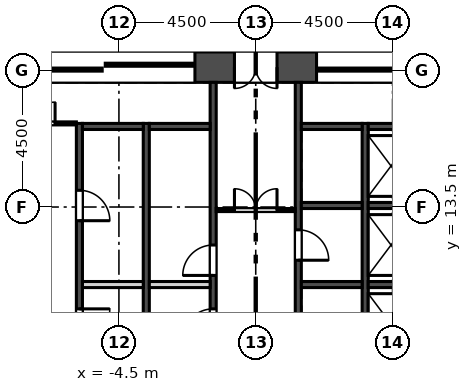
"""IFC4 building model, lengths in metres.
Left out: names, types, materials, properties, quantities, classifications, styles, units other than length and angle.
Written with IfcOpenShell. Run it as: python <this file> out.ifc"""

import sys

from ifc_helpers import new_model, si_unit, direction, frame, frame_2d, origin, place, context, subcontext, project, spatial, rectangle, extrude, element, fill, save


model = new_model("IFC4")
c1 = context("Model", 3, precision=1e-05, world=origin(), true_north=direction((0.0, 1.0)))
c2 = subcontext(c1, "Body", "Model", "MODEL_VIEW")
j1 = project(units=[si_unit("LENGTHUNIT", "METRE"), si_unit("PLANEANGLEUNIT", "RADIAN")], contexts=[c1])
p1 = place(None, origin())
s1 = spatial("IfcSite", under=j1, at=p1, CompositionType="ELEMENT")
p2 = place(p1, origin())
s2 = spatial("IfcBuilding", under=s1, at=p2, CompositionType="ELEMENT")
p3 = place(p2, frame((0.0, 0.0, 218.1)))
s3 = spatial("IfcBuildingStorey", under=s2, at=p3, CompositionType="ELEMENT", Elevation=218.1)
p4 = place(p3, frame((9.181, 18.1, 0.0), z_axis=(0.0, 0.0, 1.0), x_axis=(-1.0, 0.0, 0.0)))
e1 = element("IfcWall", 1, at=p4, inside=s3, PredefinedType="SHEAR", context=c2, shape_type="SweptSolid", body=[
    extrude(rectangle(XDim=18.361, YDim=1.0, at=frame_2d((9.181, 0.0))), origin(), (0.0, 0.0, 1.0), 5.4),
])
p5 = place(p4, frame((8.481, 0.0, 0.0)))
e2 = element("IfcOpeningElement", 2, at=p5, cuts=e1, PredefinedType="OPENING", context=c2, shape_type="SweptSolid", body=[
    extrude(rectangle(XDim=1.4, YDim=2.1, at=frame_2d((0.7, 1.05))), frame((0.0, 0.51, 0.0), z_axis=(0.0, -1.0, 0.0), x_axis=(1.0, 0.0, 0.0)), (0.0, 0.0, 1.0), 1.02),
])
p6 = place(p4, frame((11.181, 0.0, 0.0)))
e3 = element("IfcOpeningElement", 3, at=p6, cuts=e1, PredefinedType="OPENING", context=c2, shape_type="SweptSolid", body=[
    extrude(rectangle(XDim=6.0, YDim=2.4, at=frame_2d((3.0, 1.2))), frame((0.0, 0.51, 0.0), z_axis=(0.0, -1.0, 0.0), x_axis=(1.0, 0.0, 0.0)), (0.0, 0.0, 1.0), 1.02),
])
p7 = place(p4, frame((1.181, 0.0, 0.0)))
e4 = element("IfcOpeningElement", 4, at=p7, cuts=e1, PredefinedType="OPENING", context=c2, shape_type="SweptSolid", body=[
    extrude(rectangle(XDim=6.0, YDim=2.4, at=frame_2d((3.0, 1.2))), frame((0.0, 0.51, 0.0), z_axis=(0.0, -1.0, 0.0), x_axis=(1.0, 0.0, 0.0)), (0.0, 0.0, 1.0), 1.02),
])
p8 = place(p3, frame((27.139, 7.709, 0.0), z_axis=(0.0, 0.0, 1.0), x_axis=(-0.500000533701, 0.866025095652, 0.0)))
e5 = element("IfcWall", 5, at=p8, inside=s3, PredefinedType="SOLIDWALL", context=c2, shape_type="SweptSolid", body=[
    extrude(rectangle(XDim=45.573, YDim=0.34, at=frame_2d((22.787, 0.0))), origin(), (0.0, 0.0, 1.0), 5.0),
])
p9 = place(p8, frame((1.893, 0.0, 0.9)))
e6 = element("IfcOpeningElement", 6, at=p9, cuts=e5, PredefinedType="OPENING", context=c2, shape_type="SweptSolid", body=[
    extrude(rectangle(XDim=1.885, YDim=3.0, at=frame_2d((0.942, 1.5))), frame((0.0, 0.18, 0.0), z_axis=(0.0, -1.0, 0.0), x_axis=(1.0, 0.0, 0.0)), (0.0, 0.0, 1.0), 0.36),
])
p10 = place(p8, frame((4.893, 0.0, 0.9)))
e7 = element("IfcOpeningElement", 7, at=p10, cuts=e5, PredefinedType="OPENING", context=c2, shape_type="SweptSolid", body=[
    extrude(rectangle(XDim=1.885, YDim=3.0, at=frame_2d((0.942, 1.5))), frame((0.0, 0.18, 0.0), z_axis=(0.0, -1.0, 0.0), x_axis=(1.0, 0.0, 0.0)), (0.0, 0.0, 1.0), 0.36),
])
p11 = place(p8, frame((7.893, 0.0, 0.9)))
e8 = element("IfcOpeningElement", 8, at=p11, cuts=e5, PredefinedType="OPENING", context=c2, shape_type="SweptSolid", body=[
    extrude(rectangle(XDim=1.885, YDim=3.0, at=frame_2d((0.942, 1.5))), frame((0.0, 0.18, 0.0), z_axis=(0.0, -1.0, 0.0), x_axis=(1.0, 0.0, 0.0)), (0.0, 0.0, 1.0), 0.36),
])
p12 = place(p8, frame((10.893, 0.0, 0.9)))
e9 = element("IfcOpeningElement", 9, at=p12, cuts=e5, PredefinedType="OPENING", context=c2, shape_type="SweptSolid", body=[
    extrude(rectangle(XDim=1.885, YDim=3.0, at=frame_2d((0.942, 1.5))), frame((0.0, 0.18, 0.0), z_axis=(0.0, -1.0, 0.0), x_axis=(1.0, 0.0, 0.0)), (0.0, 0.0, 1.0), 0.36),
])
p13 = place(p8, frame((13.893, 0.0, 0.9)))
e10 = element("IfcOpeningElement", 10, at=p13, cuts=e5, PredefinedType="OPENING", context=c2, shape_type="SweptSolid", body=[
    extrude(rectangle(XDim=1.885, YDim=3.0, at=frame_2d((0.942, 1.5))), frame((0.0, 0.18, 0.0), z_axis=(0.0, -1.0, 0.0), x_axis=(1.0, 0.0, 0.0)), (0.0, 0.0, 1.0), 0.36),
])
p14 = place(p8, frame((16.893, 0.0, 0.9)))
e11 = element("IfcOpeningElement", 11, at=p14, cuts=e5, PredefinedType="OPENING", context=c2, shape_type="SweptSolid", body=[
    extrude(rectangle(XDim=1.885, YDim=3.0, at=frame_2d((0.942, 1.5))), frame((0.0, 0.18, 0.0), z_axis=(0.0, -1.0, 0.0), x_axis=(1.0, 0.0, 0.0)), (0.0, 0.0, 1.0), 0.36),
])
p15 = place(p8, frame((19.893, 0.0, 0.9)))
e12 = element("IfcOpeningElement", 12, at=p15, cuts=e5, PredefinedType="OPENING", context=c2, shape_type="SweptSolid", body=[
    extrude(rectangle(XDim=1.885, YDim=3.0, at=frame_2d((0.942, 1.5))), frame((0.0, 0.18, 0.0), z_axis=(0.0, -1.0, 0.0), x_axis=(1.0, 0.0, 0.0)), (0.0, 0.0, 1.0), 0.36),
])
p16 = place(p8, frame((22.893, 0.0, 0.9)))
e13 = element("IfcOpeningElement", 13, at=p16, cuts=e5, PredefinedType="OPENING", context=c2, shape_type="SweptSolid", body=[
    extrude(rectangle(XDim=1.885, YDim=3.0, at=frame_2d((0.942, 1.5))), frame((0.0, 0.18, 0.0), z_axis=(0.0, -1.0, 0.0), x_axis=(1.0, 0.0, 0.0)), (0.0, 0.0, 1.0), 0.36),
])
p17 = place(p8, frame((25.893, 0.0, 0.9)))
e14 = element("IfcOpeningElement", 14, at=p17, cuts=e5, PredefinedType="OPENING", context=c2, shape_type="SweptSolid", body=[
    extrude(rectangle(XDim=1.885, YDim=3.0, at=frame_2d((0.942, 1.5))), frame((0.0, 0.18, 0.0), z_axis=(0.0, -1.0, 0.0), x_axis=(1.0, 0.0, 0.0)), (0.0, 0.0, 1.0), 0.36),
])
p18 = place(p8, frame((28.893, 0.0, 0.9)))
e15 = element("IfcOpeningElement", 15, at=p18, cuts=e5, PredefinedType="OPENING", context=c2, shape_type="SweptSolid", body=[
    extrude(rectangle(XDim=1.885, YDim=3.0, at=frame_2d((0.942, 1.5))), frame((0.0, 0.18, 0.0), z_axis=(0.0, -1.0, 0.0), x_axis=(1.0, 0.0, 0.0)), (0.0, 0.0, 1.0), 0.36),
])
p19 = place(p8, frame((31.893, 0.0, 0.9)))
e16 = element("IfcOpeningElement", 16, at=p19, cuts=e5, PredefinedType="OPENING", context=c2, shape_type="SweptSolid", body=[
    extrude(rectangle(XDim=1.885, YDim=3.0, at=frame_2d((0.942, 1.5))), frame((0.0, 0.18, 0.0), z_axis=(0.0, -1.0, 0.0), x_axis=(1.0, 0.0, 0.0)), (0.0, 0.0, 1.0), 0.36),
])
p20 = place(p8, frame((34.893, 0.0, 0.9)))
e17 = element("IfcOpeningElement", 17, at=p20, cuts=e5, PredefinedType="OPENING", context=c2, shape_type="SweptSolid", body=[
    extrude(rectangle(XDim=1.885, YDim=3.0, at=frame_2d((0.942, 1.5))), frame((0.0, 0.18, 0.0), z_axis=(0.0, -1.0, 0.0), x_axis=(1.0, 0.0, 0.0)), (0.0, 0.0, 1.0), 0.36),
])
p21 = place(p8, frame((37.893, 0.0, 0.9)))
e18 = element("IfcOpeningElement", 18, at=p21, cuts=e5, PredefinedType="OPENING", context=c2, shape_type="SweptSolid", body=[
    extrude(rectangle(XDim=1.885, YDim=3.0, at=frame_2d((0.942, 1.5))), frame((0.0, 0.18, 0.0), z_axis=(0.0, -1.0, 0.0), x_axis=(1.0, 0.0, 0.0)), (0.0, 0.0, 1.0), 0.36),
])
p22 = place(p8, frame((40.893, 0.0, 0.9)))
e19 = element("IfcOpeningElement", 19, at=p22, cuts=e5, PredefinedType="OPENING", context=c2, shape_type="SweptSolid", body=[
    extrude(rectangle(XDim=1.885, YDim=3.0, at=frame_2d((0.942, 1.5))), frame((0.0, 0.18, 0.0), z_axis=(0.0, -1.0, 0.0), x_axis=(1.0, 0.0, 0.0)), (0.0, 0.0, 1.0), 0.36),
])
p23 = place(p3, frame((-4.353, 47.177, 0.0), z_axis=(0.0, 0.0, 1.0), x_axis=(-0.500000533701, -0.866025095652, 0.0)))
e20 = element("IfcWall", 20, at=p23, inside=s3, PredefinedType="SOLIDWALL", context=c2, shape_type="SweptSolid", body=[
    extrude(rectangle(XDim=45.573, YDim=0.34, at=frame_2d((22.787, 0.0))), origin(), (0.0, 0.0, 1.0), 5.0),
])
p24 = place(p23, frame((2.68, 0.0, 0.9)))
e21 = element("IfcOpeningElement", 21, at=p24, cuts=e20, PredefinedType="OPENING", context=c2, shape_type="SweptSolid", body=[
    extrude(rectangle(XDim=1.885, YDim=3.0, at=frame_2d((0.942, 1.5))), frame((0.0, 0.18, 0.0), z_axis=(0.0, -1.0, 0.0), x_axis=(1.0, 0.0, 0.0)), (0.0, 0.0, 1.0), 0.36),
])
p25 = place(p23, frame((5.68, 0.0, 0.9)))
e22 = element("IfcOpeningElement", 22, at=p25, cuts=e20, PredefinedType="OPENING", context=c2, shape_type="SweptSolid", body=[
    extrude(rectangle(XDim=1.885, YDim=3.0, at=frame_2d((0.942, 1.5))), frame((0.0, 0.18, 0.0), z_axis=(0.0, -1.0, 0.0), x_axis=(1.0, 0.0, 0.0)), (0.0, 0.0, 1.0), 0.36),
])
p26 = place(p23, frame((8.68, 0.0, 0.9)))
e23 = element("IfcOpeningElement", 23, at=p26, cuts=e20, PredefinedType="OPENING", context=c2, shape_type="SweptSolid", body=[
    extrude(rectangle(XDim=1.885, YDim=3.0, at=frame_2d((0.942, 1.5))), frame((0.0, 0.18, 0.0), z_axis=(0.0, -1.0, 0.0), x_axis=(1.0, 0.0, 0.0)), (0.0, 0.0, 1.0), 0.36),
])
p27 = place(p23, frame((11.68, 0.0, 0.9)))
e24 = element("IfcOpeningElement", 24, at=p27, cuts=e20, PredefinedType="OPENING", context=c2, shape_type="SweptSolid", body=[
    extrude(rectangle(XDim=1.885, YDim=3.0, at=frame_2d((0.942, 1.5))), frame((0.0, 0.18, 0.0), z_axis=(0.0, -1.0, 0.0), x_axis=(1.0, 0.0, 0.0)), (0.0, 0.0, 1.0), 0.36),
])
p28 = place(p23, frame((14.68, 0.0, 0.9)))
e25 = element("IfcOpeningElement", 25, at=p28, cuts=e20, PredefinedType="OPENING", context=c2, shape_type="SweptSolid", body=[
    extrude(rectangle(XDim=1.885, YDim=3.0, at=frame_2d((0.942, 1.5))), frame((0.0, 0.18, 0.0), z_axis=(0.0, -1.0, 0.0), x_axis=(1.0, 0.0, 0.0)), (0.0, 0.0, 1.0), 0.36),
])
p29 = place(p23, frame((17.68, 0.0, 0.9)))
e26 = element("IfcOpeningElement", 26, at=p29, cuts=e20, PredefinedType="OPENING", context=c2, shape_type="SweptSolid", body=[
    extrude(rectangle(XDim=1.885, YDim=3.0, at=frame_2d((0.942, 1.5))), frame((0.0, 0.18, 0.0), z_axis=(0.0, -1.0, 0.0), x_axis=(1.0, 0.0, 0.0)), (0.0, 0.0, 1.0), 0.36),
])
p30 = place(p23, frame((20.68, 0.0, 0.9)))
e27 = element("IfcOpeningElement", 27, at=p30, cuts=e20, PredefinedType="OPENING", context=c2, shape_type="SweptSolid", body=[
    extrude(rectangle(XDim=1.885, YDim=3.0, at=frame_2d((0.942, 1.5))), frame((0.0, 0.18, 0.0), z_axis=(0.0, -1.0, 0.0), x_axis=(1.0, 0.0, 0.0)), (0.0, 0.0, 1.0), 0.36),
])
p31 = place(p23, frame((23.68, 0.0, 0.9)))
e28 = element("IfcOpeningElement", 28, at=p31, cuts=e20, PredefinedType="OPENING", context=c2, shape_type="SweptSolid", body=[
    extrude(rectangle(XDim=1.885, YDim=3.0, at=frame_2d((0.942, 1.5))), frame((0.0, 0.18, 0.0), z_axis=(0.0, -1.0, 0.0), x_axis=(1.0, 0.0, 0.0)), (0.0, 0.0, 1.0), 0.36),
])
p32 = place(p23, frame((26.68, 0.0, 0.9)))
e29 = element("IfcOpeningElement", 29, at=p32, cuts=e20, PredefinedType="OPENING", context=c2, shape_type="SweptSolid", body=[
    extrude(rectangle(XDim=1.885, YDim=3.0, at=frame_2d((0.942, 1.5))), frame((0.0, 0.18, 0.0), z_axis=(0.0, -1.0, 0.0), x_axis=(1.0, 0.0, 0.0)), (0.0, 0.0, 1.0), 0.36),
])
p33 = place(p23, frame((29.68, 0.0, 0.9)))
e30 = element("IfcOpeningElement", 30, at=p33, cuts=e20, PredefinedType="OPENING", context=c2, shape_type="SweptSolid", body=[
    extrude(rectangle(XDim=1.885, YDim=3.0, at=frame_2d((0.942, 1.5))), frame((0.0, 0.18, 0.0), z_axis=(0.0, -1.0, 0.0), x_axis=(1.0, 0.0, 0.0)), (0.0, 0.0, 1.0), 0.36),
])
p34 = place(p23, frame((32.68, 0.0, 0.9)))
e31 = element("IfcOpeningElement", 31, at=p34, cuts=e20, PredefinedType="OPENING", context=c2, shape_type="SweptSolid", body=[
    extrude(rectangle(XDim=1.885, YDim=3.0, at=frame_2d((0.942, 1.5))), frame((0.0, 0.18, 0.0), z_axis=(0.0, -1.0, 0.0), x_axis=(1.0, 0.0, 0.0)), (0.0, 0.0, 1.0), 0.36),
])
p35 = place(p23, frame((35.68, 0.0, 0.9)))
e32 = element("IfcOpeningElement", 32, at=p35, cuts=e20, PredefinedType="OPENING", context=c2, shape_type="SweptSolid", body=[
    extrude(rectangle(XDim=1.885, YDim=3.0, at=frame_2d((0.942, 1.5))), frame((0.0, 0.18, 0.0), z_axis=(0.0, -1.0, 0.0), x_axis=(1.0, 0.0, 0.0)), (0.0, 0.0, 1.0), 0.36),
])
p36 = place(p23, frame((38.68, 0.0, 0.9)))
e33 = element("IfcOpeningElement", 33, at=p36, cuts=e20, PredefinedType="OPENING", context=c2, shape_type="SweptSolid", body=[
    extrude(rectangle(XDim=1.885, YDim=3.0, at=frame_2d((0.942, 1.5))), frame((0.0, 0.18, 0.0), z_axis=(0.0, -1.0, 0.0), x_axis=(1.0, 0.0, 0.0)), (0.0, 0.0, 1.0), 0.36),
])
p37 = place(p23, frame((41.68, 0.0, 0.9)))
e34 = element("IfcOpeningElement", 34, at=p37, cuts=e20, PredefinedType="OPENING", context=c2, shape_type="SweptSolid", body=[
    extrude(rectangle(XDim=1.885, YDim=3.0, at=frame_2d((0.942, 1.5))), frame((0.0, 0.18, 0.0), z_axis=(0.0, -1.0, 0.0), x_axis=(1.0, 0.0, 0.0)), (0.0, 0.0, 1.0), 0.36),
])
p38 = place(p3, frame((-5.8, 8.25, -0.4), z_axis=(0.0, 0.0, 1.0), x_axis=(0.0, 1.0, 0.0)))
e35 = element("IfcWall", 35, at=p38, inside=s3, PredefinedType="SOLIDWALL", context=c2, shape_type="SweptSolid", body=[
    extrude(rectangle(XDim=8.0, YDim=0.2, at=frame_2d((4.0, 0.0))), origin(), (0.0, 0.0, 1.0), 5.4),
])
p39 = place(p38, frame((0.9, 0.0, 0.4)))
e36 = element("IfcOpeningElement", 36, at=p39, cuts=e35, PredefinedType="OPENING", context=c2, shape_type="SweptSolid", body=[
    extrude(rectangle(XDim=1.0, YDim=2.1, at=frame_2d((0.5, 1.05))), frame((0.0, 0.11, 0.0), z_axis=(0.0, -1.0, 0.0), x_axis=(1.0, 0.0, 0.0)), (0.0, 0.0, 1.0), 0.22),
])
p40 = place(p38, frame((4.8, 0.0, 0.4)))
e37 = element("IfcOpeningElement", 37, at=p40, cuts=e35, PredefinedType="OPENING", context=c2, shape_type="SweptSolid", body=[
    extrude(rectangle(XDim=1.0, YDim=2.1, at=frame_2d((0.5, 1.05))), frame((0.0, 0.11, 0.0), z_axis=(0.0, -1.0, 0.0), x_axis=(1.0, 0.0, 0.0)), (0.0, 0.0, 1.0), 0.22),
])
for number, where, z_axis, x_axis in (
    (38, (-3.6, 8.45, -0.4), (0.0, 0.0, 1.0), (0.0, 1.0, 0.0)),
    (39, (3.6, 8.45, -0.4), (0.0, 0.0, 1.0), (0.0, 1.0, 0.0)),
):
    element("IfcWall", number, at=place(p3, frame(where, z_axis=z_axis, x_axis=x_axis)), inside=s3, PredefinedType="SOLIDWALL", context=c2, shape_type="SweptSolid", body=[
        extrude(rectangle(XDim=7.8, YDim=0.2, at=frame_2d((3.9, 0.0))), origin(), (0.0, 0.0, 1.0), 5.4),
    ])
p41 = place(p3, frame((-1.4, 5.85, -0.4), z_axis=(0.0, 0.0, 1.0), x_axis=(0.0, 1.0, 0.0)))
e40 = element("IfcWall", 40, at=p41, inside=s3, PredefinedType="SOLIDWALL", context=c2, shape_type="SweptSolid", body=[
    extrude(rectangle(XDim=11.75, YDim=0.2, at=frame_2d((5.875, 0.0))), origin(), (0.0, 0.0, 1.0), 5.4),
])
p42 = place(p41, frame((0.65, 0.0, 0.4)))
e41 = element("IfcOpeningElement", 41, at=p42, cuts=e40, PredefinedType="OPENING", context=c2, shape_type="SweptSolid", body=[
    extrude(rectangle(XDim=1.1, YDim=2.1, at=frame_2d((0.55, 1.05))), frame((0.0, 0.11, 0.0), z_axis=(0.0, -1.0, 0.0), x_axis=(1.0, 0.0, 0.0)), (0.0, 0.0, 1.0), 0.22),
])
p43 = place(p41, frame((3.3, 0.0, 0.4)))
e42 = element("IfcOpeningElement", 42, at=p43, cuts=e40, PredefinedType="OPENING", context=c2, shape_type="SweptSolid", body=[
    extrude(rectangle(XDim=1.0, YDim=2.1, at=frame_2d((0.5, 1.05))), frame((0.0, 0.11, 0.0), z_axis=(0.0, -1.0, 0.0), x_axis=(1.0, 0.0, 0.0)), (0.0, 0.0, 1.0), 0.22),
])
p44 = place(p41, frame((5.4, 0.0, 0.4)))
e43 = element("IfcOpeningElement", 43, at=p44, cuts=e40, PredefinedType="OPENING", context=c2, shape_type="SweptSolid", body=[
    extrude(rectangle(XDim=1.0, YDim=2.1, at=frame_2d((0.5, 1.05))), frame((0.0, 0.11, 0.0), z_axis=(0.0, -1.0, 0.0), x_axis=(1.0, 0.0, 0.0)), (0.0, 0.0, 1.0), 0.22),
])
p45 = place(p3, frame((1.4, 5.85, -0.4), z_axis=(0.0, 0.0, 1.0), x_axis=(0.0, 1.0, 0.0)))
e44 = element("IfcWall", 44, at=p45, inside=s3, PredefinedType="SOLIDWALL", context=c2, shape_type="SweptSolid", body=[
    extrude(rectangle(XDim=11.75, YDim=0.2, at=frame_2d((5.875, 0.0))), origin(), (0.0, 0.0, 1.0), 5.4),
])
p46 = place(p45, frame((0.65, 0.0, 0.4)))
e45 = element("IfcOpeningElement", 45, at=p46, cuts=e44, PredefinedType="OPENING", context=c2, shape_type="SweptSolid", body=[
    extrude(rectangle(XDim=1.1, YDim=2.1, at=frame_2d((0.55, 1.05))), frame((0.0, 0.11, 0.0), z_axis=(0.0, -1.0, 0.0), x_axis=(1.0, 0.0, 0.0)), (0.0, 0.0, 1.0), 0.22),
])
p47 = place(p45, frame((5.9, 0.0, 0.4)))
e46 = element("IfcOpeningElement", 46, at=p47, cuts=e44, PredefinedType="OPENING", context=c2, shape_type="SweptSolid", body=[
    extrude(rectangle(XDim=1.0, YDim=2.1, at=frame_2d((0.5, 1.05))), frame((0.0, 0.11, 0.0), z_axis=(0.0, -1.0, 0.0), x_axis=(1.0, 0.0, 0.0)), (0.0, 0.0, 1.0), 0.22),
])
p48 = place(p3, frame((-5.7, 10.95, 0.0), z_axis=(0.0, 0.0, 1.0), x_axis=(1.0, 0.0, 0.0)))
e47 = element("IfcWall", 47, at=p48, inside=s3, PredefinedType="SOLIDWALL", context=c2, shape_type="SweptSolid", body=[
    extrude(rectangle(XDim=2.0, YDim=0.2, at=frame_2d((1.0, 0.0))), origin(), (0.0, 0.0, 1.0), 5.0),
])
p49 = place(p3, frame((-5.7, 16.15, -0.4), z_axis=(0.0, 0.0, 1.0), x_axis=(1.0, 0.0, 0.0)))
e48 = element("IfcWall", 48, at=p49, inside=s3, PredefinedType="SOLIDWALL", context=c2, shape_type="SweptSolid", body=[
    extrude(rectangle(XDim=2.0, YDim=0.2, at=frame_2d((1.0, 0.0))), origin(), (0.0, 0.0, 1.0), 5.4),
])
p50 = place(p3, frame((-3.5, 10.95, 0.0), z_axis=(0.0, 0.0, 1.0), x_axis=(1.0, 0.0, 0.0)))
e49 = element("IfcWall", 49, at=p50, inside=s3, PredefinedType="SOLIDWALL", context=c2, shape_type="SweptSolid", body=[
    extrude(rectangle(XDim=2.0, YDim=0.2, at=frame_2d((1.0, 0.0))), origin(), (0.0, 0.0, 1.0), 5.0),
])
for number, where, z_axis, x_axis in (
    (50, (-3.5, 16.15, -0.4), (0.0, 0.0, 1.0), (1.0, 0.0, 0.0)),
    (51, (3.7, 10.95, -0.4), (0.0, 0.0, 1.0), (1.0, 0.0, 0.0)),
    (52, (3.7, 13.55, -0.4), (0.0, 0.0, 1.0), (1.0, 0.0, 0.0)),
    (53, (3.7, 16.15, -0.4), (0.0, 0.0, 1.0), (1.0, 0.0, 0.0)),
    (54, (1.5, 10.95, -0.4), (0.0, 0.0, 1.0), (1.0, 0.0, 0.0)),
    (55, (1.5, 13.55, -0.4), (0.0, 0.0, 1.0), (1.0, 0.0, 0.0)),
    (56, (1.5, 16.15, -0.4), (0.0, 0.0, 1.0), (1.0, 0.0, 0.0)),
):
    element("IfcWall", number, at=place(p3, frame(where, z_axis=z_axis, x_axis=x_axis)), inside=s3, PredefinedType="SOLIDWALL", context=c2, shape_type="SweptSolid", body=[
        extrude(rectangle(XDim=2.0, YDim=0.2, at=frame_2d((1.0, 0.0))), origin(), (0.0, 0.0, 1.0), 5.4),
    ])
p51 = place(p3, frame((-8.7, 16.25, 0.0), z_axis=(0.0, 0.0, 1.0), x_axis=(1.0, 0.0, 0.0)))
e57 = element("IfcWall", 57, at=p51, inside=s3, PredefinedType="PARTITIONING", context=c2, shape_type="SweptSolid", body=[
    extrude(rectangle(XDim=2.8, YDim=0.1, at=frame_2d((1.4, 0.0))), origin(), (0.0, 0.0, 1.0), 5.0),
])
p52 = place(p51, frame((0.7, 0.0, 0.0)))
e58 = element("IfcOpeningElement", 58, at=p52, cuts=e57, PredefinedType="OPENING", context=c2, shape_type="SweptSolid", body=[
    extrude(rectangle(XDim=1.4, YDim=2.1, at=frame_2d((0.7, 1.05))), frame((0.0, 0.06, 0.0), z_axis=(0.0, -1.0, 0.0), x_axis=(1.0, 0.0, 0.0)), (0.0, 0.0, 1.0), 0.12),
])
p53 = place(p3, frame((-1.3, 13.4, 0.0), z_axis=(0.0, 0.0, 1.0), x_axis=(1.0, 0.0, 0.0)))
e59 = element("IfcWall", 59, at=p53, inside=s3, PredefinedType="PARTITIONING", context=c2, shape_type="SweptSolid", body=[
    extrude(rectangle(XDim=2.6, YDim=0.1, at=frame_2d((1.3, 0.0))), origin(), (0.0, 0.0, 1.0), 5.0),
])
p54 = place(p53, frame((0.6, 0.0, 0.0)))
e60 = element("IfcOpeningElement", 60, at=p54, cuts=e59, PredefinedType="OPENING", context=c2, shape_type="SweptSolid", body=[
    extrude(rectangle(XDim=1.4, YDim=2.1, at=frame_2d((0.7, 1.05))), frame((0.0, 0.06, 0.0), z_axis=(0.0, -1.0, 0.0), x_axis=(1.0, 0.0, 0.0)), (0.0, 0.0, 1.0), 0.12),
])
p55 = place(p39, frame((1.0, 0.0, 0.0), z_axis=(0.0, 0.0, 1.0), x_axis=(-1.0, 0.0, 0.0)))
e61 = element("IfcDoor", 61, at=p55, inside=s3, OperationType="SINGLE_SWING_LEFT", PredefinedType="DOOR", context=c2, shape_type="SweptSolid", body=[
    extrude(rectangle(XDim=1.0, YDim=2.1, at=frame_2d((0.5, 1.05))), frame((0.0, 0.025, 0.0), z_axis=(0.0, -1.0, 0.0), x_axis=(1.0, 0.0, 0.0)), (0.0, 0.0, 1.0), 0.05),
])
fill(e36, e61)
p56 = place(p40, frame((1.0, 0.0, 0.0), z_axis=(0.0, 0.0, 1.0), x_axis=(-1.0, 0.0, 0.0)))
e62 = element("IfcDoor", 62, at=p56, inside=s3, OperationType="SINGLE_SWING_RIGHT", PredefinedType="DOOR", context=c2, shape_type="SweptSolid", body=[
    extrude(rectangle(XDim=1.0, YDim=2.1, at=frame_2d((0.5, 1.05))), frame((0.0, 0.025, 0.0), z_axis=(0.0, -1.0, 0.0), x_axis=(1.0, 0.0, 0.0)), (0.0, 0.0, 1.0), 0.05),
])
fill(e37, e62)
p57 = place(p43, origin())
e63 = element("IfcDoor", 63, at=p57, inside=s3, OperationType="SINGLE_SWING_LEFT", PredefinedType="DOOR", context=c2, shape_type="SweptSolid", body=[
    extrude(rectangle(XDim=1.0, YDim=2.1, at=frame_2d((0.5, 1.05))), frame((0.0, 0.025, 0.0), z_axis=(0.0, -1.0, 0.0), x_axis=(1.0, 0.0, 0.0)), (0.0, 0.0, 1.0), 0.05),
])
fill(e42, e63)
p58 = place(p44, origin())
e64 = element("IfcDoor", 64, at=p58, inside=s3, OperationType="SINGLE_SWING_LEFT", PredefinedType="DOOR", context=c2, shape_type="SweptSolid", body=[
    extrude(rectangle(XDim=1.0, YDim=2.1, at=frame_2d((0.5, 1.05))), frame((0.0, 0.025, 0.0), z_axis=(0.0, -1.0, 0.0), x_axis=(1.0, 0.0, 0.0)), (0.0, 0.0, 1.0), 0.05),
])
fill(e43, e64)
p59 = place(p47, frame((1.0, 0.0, 0.0), z_axis=(0.0, 0.0, 1.0), x_axis=(-1.0, 0.0, 0.0)))
e65 = element("IfcDoor", 65, at=p59, inside=s3, OperationType="SINGLE_SWING_RIGHT", PredefinedType="DOOR", context=c2, shape_type="SweptSolid", body=[
    extrude(rectangle(XDim=1.0, YDim=2.1, at=frame_2d((0.5, 1.05))), frame((0.0, 0.025, 0.0), z_axis=(0.0, -1.0, 0.0), x_axis=(1.0, 0.0, 0.0)), (0.0, 0.0, 1.0), 0.05),
])
fill(e46, e65)
p60 = place(p52, origin())
e66 = element("IfcDoor", 66, at=p60, inside=s3, OperationType="DOUBLE_DOOR_SINGLE_SWING", PredefinedType="DOOR", context=c2, shape_type="SweptSolid", body=[
    extrude(rectangle(XDim=1.4, YDim=2.1, at=frame_2d((0.7, 1.05))), frame((0.0, 0.025, 0.0), z_axis=(0.0, -1.0, 0.0), x_axis=(1.0, 0.0, 0.0)), (0.0, 0.0, 1.0), 0.05),
])
fill(e58, e66)
p61 = place(p54, origin())
e67 = element("IfcDoor", 67, at=p61, inside=s3, OperationType="DOUBLE_DOOR_SINGLE_SWING", PredefinedType="DOOR", context=c2, shape_type="SweptSolid", body=[
    extrude(rectangle(XDim=1.4, YDim=2.1, at=frame_2d((0.7, 1.05))), frame((0.0, 0.025, 0.0), z_axis=(0.0, -1.0, 0.0), x_axis=(1.0, 0.0, 0.0)), (0.0, 0.0, 1.0), 0.05),
])
fill(e60, e67)
p62 = place(p5, origin())
e68 = element("IfcDoor", 68, at=p62, inside=s3, OperationType="DOUBLE_DOOR_SINGLE_SWING", PredefinedType="DOOR", context=c2, shape_type="SweptSolid", body=[
    extrude(rectangle(XDim=1.4, YDim=2.1, at=frame_2d((0.7, 1.05))), frame((0.0, 0.025, 0.0), z_axis=(0.0, -1.0, 0.0), x_axis=(1.0, 0.0, 0.0)), (0.0, 0.0, 1.0), 0.05),
])
fill(e2, e68)
p63 = place(p6, origin())
e69 = element("IfcDoor", 69, at=p63, inside=s3, OperationType="DOUBLE_DOOR_SLIDING", PredefinedType="DOOR", context=c2, shape_type="SweptSolid", body=[
    extrude(rectangle(XDim=6.0, YDim=2.4, at=frame_2d((3.0, 1.2))), frame((0.0, 0.025, 0.0), z_axis=(0.0, -1.0, 0.0), x_axis=(1.0, 0.0, 0.0)), (0.0, 0.0, 1.0), 0.05),
])
fill(e3, e69)
p64 = place(p7, origin())
e70 = element("IfcDoor", 70, at=p64, inside=s3, OperationType="DOUBLE_DOOR_SLIDING", PredefinedType="DOOR", context=c2, shape_type="SweptSolid", body=[
    extrude(rectangle(XDim=6.0, YDim=2.4, at=frame_2d((3.0, 1.2))), frame((0.0, 0.025, 0.0), z_axis=(0.0, -1.0, 0.0), x_axis=(1.0, 0.0, 0.0)), (0.0, 0.0, 1.0), 0.05),
])
fill(e4, e70)
save(model, sys.argv[1])
